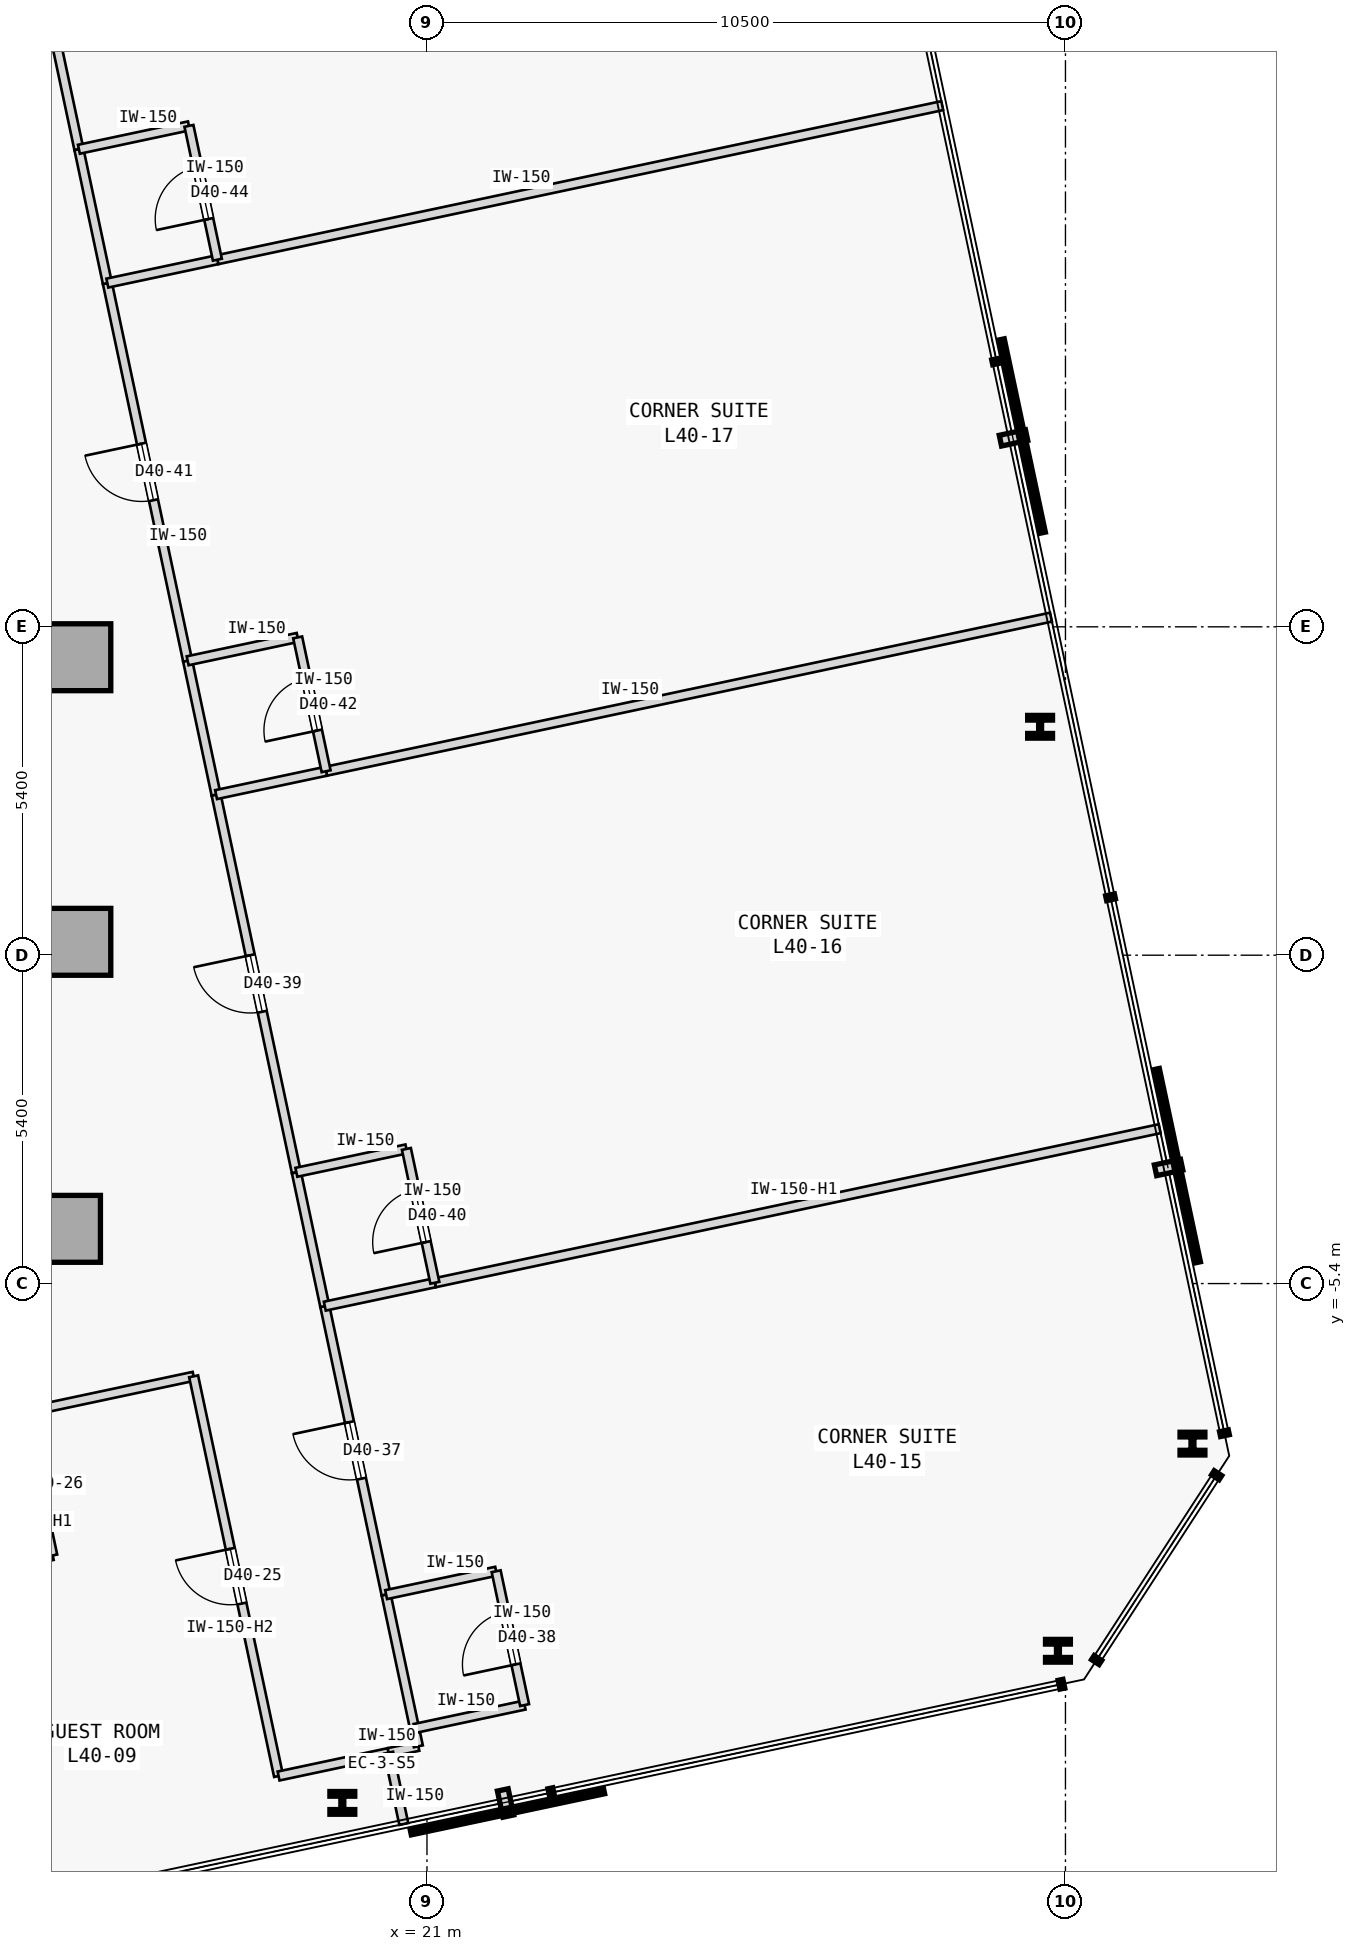
"""IFC4 building model, lengths in metres.
Left out: names, types, materials, properties, quantities, classifications, styles, units other than length and angle.
Written with IfcOpenShell. Run it as: python <this file> out.ifc"""

import sys

from ifc_helpers import new_model, si_unit, direction, frame, frame_2d, origin, origin_2d, place, context, subcontext, project, spatial, rectangle, i_section, extrude, element, fill, save


model = new_model("IFC4")
c1 = context("Model", 3, precision=1e-05, world=origin(), true_north=direction((0.0, 1.0)))
c2 = subcontext(c1, "Body", "Model", "MODEL_VIEW")
j1 = project(units=[si_unit("LENGTHUNIT", "METRE"), si_unit("PLANEANGLEUNIT", "RADIAN")], contexts=[c1])
p1 = place(None, origin())
s1 = spatial("IfcSite", under=j1, at=p1, CompositionType="ELEMENT")
p2 = place(p1, origin())
s2 = spatial("IfcBuilding", under=s1, at=p2, CompositionType="ELEMENT")
p3 = place(p2, frame((0.0, 0.0, 158.2)))
s3 = spatial("IfcBuildingStorey", under=s2, at=p3, CompositionType="ELEMENT", Elevation=158.2)
for number, where, z_axis, x_axis in (
    (1, (15.25, 4.9, 0.0), (0.0, 0.0, 1.0), (1.0, 0.0, 0.0)),
    (2, (15.25, 0.22, 0.0), (0.0, 0.0, 1.0), (1.0, 0.0, 0.0)),
    (3, (15.08, -4.5, 0.0), (0.0, 0.0, 1.0), (1.0, 0.0, 0.0)),
):
    element("IfcColumn", number, at=place(p3, frame(where, z_axis=z_axis, x_axis=x_axis)), inside=s3, PredefinedType="COLUMN", context=c2, shape_type="SweptSolid", body=[
        extrude(rectangle(XDim=1.1, YDim=1.1, at=origin_2d()), origin(), (0.0, 0.0, 1.0), 3.4),
    ])
for number, where, z_axis, x_axis in (
    (4, (19.608, -13.94, 0.0), (0.0, 0.0, 1.0), (1.0, 0.0, 0.0)),
    (5, (31.376, -11.439, 0.0), (0.0, 0.0, 1.0), (1.0, 0.0, 0.0)),
    (6, (33.589, -8.032, 0.0), (0.0, 0.0, 1.0), (1.0, 0.0, 0.0)),
    (7, (31.083, 3.756, 0.0), (0.0, 0.0, 1.0), (1.0, 0.0, 0.0)),
):
    element("IfcColumn", number, at=place(p3, frame(where, z_axis=z_axis, x_axis=x_axis)), inside=s3, PredefinedType="COLUMN", context=c2, shape_type="SweptSolid", body=[
        extrude(i_section(OverallWidth=0.409, OverallDepth=0.374, WebThickness=0.048, FlangeThickness=0.077, FilletRadius=0.015, at=origin_2d()), origin(), (0.0, 0.0, 1.0), 3.4),
    ])
p4 = place(p3, frame((14.346, -7.524, 0.0), z_axis=(0.0, 0.0, 1.0), x_axis=(0.97816208355, 0.207843542851, 0.0)))
e8 = element("IfcWall", 8, at=p4, inside=s3, PredefinedType="PARTITIONING", context=c2, shape_type="SweptSolid", body=[
    extrude(rectangle(XDim=2.879, YDim=0.15, at=frame_2d((1.439, 0.0))), origin(), (0.0, 0.0, 1.0), 3.175),
])
p5 = place(p3, frame((18.56, -13.498, 0.0), z_axis=(0.0, 0.0, 1.0), x_axis=(-0.207888737749, 0.978152479278, 0.0)))
e9 = element("IfcWall", 9, at=p5, inside=s3, PredefinedType="PARTITIONING", context=c2, shape_type="SweptSolid", body=[
    extrude(rectangle(XDim=6.72, YDim=0.15, at=frame_2d((3.36, 0.0))), origin(), (0.0, 0.0, 1.0), 2.575),
])
p6 = place(p5, frame((2.9, 0.0, 0.0)))
e10 = element("IfcOpeningElement", 10, at=p6, cuts=e9, PredefinedType="OPENING", context=c2, shape_type="SweptSolid", body=[
    extrude(rectangle(XDim=0.92, YDim=2.15, at=frame_2d((0.46, 1.075))), frame((0.0, 0.085, 0.0), z_axis=(0.0, -1.0, 0.0), x_axis=(1.0, 0.0, 0.0)), (0.0, 0.0, 1.0), 0.17),
])
p7 = place(p3, frame((18.56, -13.498, 0.0), z_axis=(0.0, 0.0, 1.0), x_axis=(0.978160192495, 0.207852442415, 0.0)))
e11 = element("IfcWall", 11, at=p7, inside=s3, PredefinedType="PARTITIONING", context=c2, shape_type="SweptSolid", body=[
    extrude(rectangle(XDim=1.85, YDim=0.15, at=frame_2d((0.925, 0.0))), origin(), (0.0, 0.0, 1.0), 3.175),
])
p8 = place(p3, frame((20.369, -13.114, 0.0), z_axis=(0.0, 0.0, 1.0), x_axis=(0.978143962546, 0.207928806409, 0.0)))
e12 = element("IfcWall", 12, at=p8, inside=s3, PredefinedType="PARTITIONING", context=c2, shape_type="SweptSolid", body=[
    extrude(rectangle(XDim=0.5, YDim=0.15, at=frame_2d((0.25, 0.0))), origin(), (0.0, 0.0, 1.0), 3.175),
])
p9 = place(p3, frame((20.858, -13.01, 0.0), z_axis=(0.0, 0.0, 1.0), x_axis=(-0.208306395052, 0.978063620518, 0.0)))
e13 = element("IfcWall", 13, at=p9, inside=s3, PredefinedType="PARTITIONING", context=c2, shape_type="SweptSolid", body=[
    extrude(rectangle(XDim=0.3, YDim=0.15, at=frame_2d((0.15, 0.0))), origin(), (0.0, 0.0, 1.0), 3.175),
])
p10 = place(p3, frame((20.328, -10.515, 0.0), z_axis=(0.0, 0.0, 1.0), x_axis=(-0.207950868925, 0.97813927235, 0.0)))
e14 = element("IfcWall", 14, at=p10, inside=s3, PredefinedType="PARTITIONING", context=c2, shape_type="SweptSolid", body=[
    extrude(rectangle(XDim=4.85, YDim=0.15, at=frame_2d((2.425, 0.0))), origin(), (0.0, 0.0, 1.0), 3.175),
])
p11 = place(p10, frame((1.95, 0.0, 0.0)))
e15 = element("IfcOpeningElement", 15, at=p11, cuts=e14, PredefinedType="OPENING", context=c2, shape_type="SweptSolid", body=[
    extrude(rectangle(XDim=0.95, YDim=2.15, at=frame_2d((0.475, 1.075))), frame((0.0, 0.085, 0.0), z_axis=(0.0, -1.0, 0.0), x_axis=(1.0, 0.0, 0.0)), (0.0, 0.0, 1.0), 0.17),
])
p12 = place(p3, frame((20.796, -12.716, 0.0), z_axis=(0.0, 0.0, 1.0), x_axis=(-0.207891197838, 0.978151956427, 0.0)))
e16 = element("IfcWall", 16, at=p12, inside=s3, PredefinedType="PARTITIONING", context=c2, shape_type="SweptSolid", body=[
    extrude(rectangle(XDim=2.25, YDim=0.15, at=frame_2d((1.125, 0.0))), origin(), (0.0, 0.0, 1.0), 3.175),
])
p13 = place(p3, frame((18.852, -3.571, 0.0), z_axis=(0.0, 0.0, 1.0), x_axis=(-0.207879907349, 0.978154355979, 0.0)))
e17 = element("IfcWall", 17, at=p13, inside=s3, PredefinedType="PARTITIONING", context=c2, shape_type="SweptSolid", body=[
    extrude(rectangle(XDim=6.35, YDim=0.15, at=frame_2d((3.175, 0.0))), origin(), (0.0, 0.0, 1.0), 3.175),
])
p14 = place(p13, frame((2.7, 0.0, 0.0)))
e18 = element("IfcOpeningElement", 18, at=p14, cuts=e17, PredefinedType="OPENING", context=c2, shape_type="SweptSolid", body=[
    extrude(rectangle(XDim=0.95, YDim=2.15, at=frame_2d((0.475, 1.075))), frame((0.0, 0.085, 0.0), z_axis=(0.0, -1.0, 0.0), x_axis=(1.0, 0.0, 0.0)), (0.0, 0.0, 1.0), 0.17),
])
p15 = place(p3, frame((19.32, -5.771, 0.0), z_axis=(0.0, 0.0, 1.0), x_axis=(-0.207913264065, 0.978147266328, 0.0)))
e19 = element("IfcWall", 19, at=p15, inside=s3, PredefinedType="PARTITIONING", context=c2, shape_type="SweptSolid", body=[
    extrude(rectangle(XDim=2.25, YDim=0.15, at=frame_2d((1.125, 0.0))), origin(), (0.0, 0.0, 1.0), 3.175),
])
p16 = place(p3, frame((17.064, 4.841, 0.0), z_axis=(0.0, 0.0, 1.0), x_axis=(-0.207924511115, 0.978144875608, 0.0)))
e20 = element("IfcWall", 20, at=p16, inside=s3, PredefinedType="PARTITIONING", context=c2, shape_type="SweptSolid", body=[
    extrude(rectangle(XDim=6.35, YDim=0.15, at=frame_2d((3.175, 0.0))), origin(), (0.0, 0.0, 1.0), 3.175),
])
p17 = place(p16, frame((2.7, 0.0, 0.0)))
e21 = element("IfcOpeningElement", 21, at=p17, cuts=e20, PredefinedType="OPENING", context=c2, shape_type="SweptSolid", body=[
    extrude(rectangle(XDim=0.95, YDim=2.15, at=frame_2d((0.475, 1.075))), frame((0.0, 0.085, 0.0), z_axis=(0.0, -1.0, 0.0), x_axis=(1.0, 0.0, 0.0)), (0.0, 0.0, 1.0), 0.17),
])
p18 = place(p3, frame((17.532, 2.641, 0.0), z_axis=(0.0, 0.0, 1.0), x_axis=(-0.207913264065, 0.978147266328, 0.0)))
e22 = element("IfcWall", 22, at=p18, inside=s3, PredefinedType="PARTITIONING", context=c2, shape_type="SweptSolid", body=[
    extrude(rectangle(XDim=2.25, YDim=0.15, at=frame_2d((1.125, 0.0))), origin(), (0.0, 0.0, 1.0), 3.175),
])
p19 = place(p3, frame((15.276, 13.253, 0.0), z_axis=(0.0, 0.0, 1.0), x_axis=(-0.207924511115, 0.978144875608, 0.0)))
e23 = element("IfcWall", 23, at=p19, inside=s3, PredefinedType="PARTITIONING", context=c2, shape_type="SweptSolid", body=[
    extrude(rectangle(XDim=6.35, YDim=0.15, at=frame_2d((3.175, 0.0))), origin(), (0.0, 0.0, 1.0), 3.175),
])
p20 = place(p19, frame((2.7, 0.0, 0.0)))
e24 = element("IfcOpeningElement", 24, at=p20, cuts=e23, PredefinedType="OPENING", context=c2, shape_type="SweptSolid", body=[
    extrude(rectangle(XDim=0.95, YDim=2.15, at=frame_2d((0.475, 1.075))), frame((0.0, 0.085, 0.0), z_axis=(0.0, -1.0, 0.0), x_axis=(1.0, 0.0, 0.0)), (0.0, 0.0, 1.0), 0.17),
])
p21 = place(p3, frame((15.744, 11.052, 0.0), z_axis=(0.0, 0.0, 1.0), x_axis=(-0.207891197838, 0.978151956427, 0.0)))
e25 = element("IfcWall", 25, at=p21, inside=s3, PredefinedType="PARTITIONING", context=c2, shape_type="SweptSolid", body=[
    extrude(rectangle(XDim=2.25, YDim=0.15, at=frame_2d((1.125, 0.0))), origin(), (0.0, 0.0, 1.0), 3.175),
])
p22 = place(p3, frame((12.742, -10.318, 0.0), z_axis=(0.0, 0.0, 1.0), x_axis=(0.978146728319, 0.207915795165, 0.0)))
e26 = element("IfcWall", 26, at=p22, inside=s3, PredefinedType="PARTITIONING", context=c2, shape_type="SweptSolid", body=[
    extrude(rectangle(XDim=2.15, YDim=0.15, at=frame_2d((1.075, 0.0))), origin(), (0.0, 0.0, 1.0), 3.175),
])
p23 = place(p3, frame((14.845, -9.871, 0.0), z_axis=(0.0, 0.0, 1.0), x_axis=(-0.207917150959, 0.978146440129, 0.0)))
e27 = element("IfcWall", 27, at=p23, inside=s3, PredefinedType="PARTITIONING", context=c2, shape_type="SweptSolid", body=[
    extrude(rectangle(XDim=2.4, YDim=0.15, at=frame_2d((1.2, 0.0))), origin(), (0.0, 0.0, 1.0), 2.725),
])
p24 = place(p23, frame((0.76, 0.0, 0.0)))
e28 = element("IfcOpeningElement", 28, at=p24, cuts=e27, PredefinedType="OPENING", context=c2, shape_type="SweptSolid", body=[
    extrude(rectangle(XDim=0.88, YDim=2.15, at=frame_2d((0.44, 1.075))), frame((0.0, 0.085, 0.0), z_axis=(0.0, -1.0, 0.0), x_axis=(1.0, 0.0, 0.0)), (0.0, 0.0, 1.0), 0.17),
])
p25 = place(p3, frame((20.619, -14.288, 0.0), z_axis=(0.0, 0.0, 1.0), x_axis=(-0.207917150959, 0.978146440129, 0.0)))
e29 = element("IfcWall", 29, at=p25, inside=s3, PredefinedType="PARTITIONING", context=c2, shape_type="SweptSolid", body=[
    extrude(rectangle(XDim=1.2, YDim=0.15, at=frame_2d((0.6, 0.0))), origin(), (0.0, 0.0, 1.0), 3.175),
])
for number, where, z_axis, x_axis in (
    (30, (20.796, -12.716, 0.0), (0.0, 0.0, 1.0), (0.978, 0.208, 0.0)),
    (31, (20.328, -10.515, 0.0), (0.0, 0.0, 1.0), (0.978, 0.208, 0.0)),
):
    element("IfcWall", number, at=place(p3, frame(where, z_axis=z_axis, x_axis=x_axis)), inside=s3, PredefinedType="PARTITIONING", context=c2, shape_type="SweptSolid", body=[
        extrude(rectangle(XDim=1.85, YDim=0.15, at=frame_2d((0.925, 0.0))), origin(), (0.0, 0.0, 1.0), 3.175),
    ])
p26 = place(p3, frame((22.605, -12.332, 0.0), z_axis=(0.0, 0.0, 1.0), x_axis=(-0.207891197838, 0.978151956427, 0.0)))
e32 = element("IfcWall", 32, at=p26, inside=s3, PredefinedType="PARTITIONING", context=c2, shape_type="SweptSolid", body=[
    extrude(rectangle(XDim=2.25, YDim=0.15, at=frame_2d((1.125, 0.0))), origin(), (0.0, 0.0, 1.0), 3.175),
])
p27 = place(p26, frame((0.685, 0.0, 0.0)))
e33 = element("IfcOpeningElement", 33, at=p27, cuts=e32, PredefinedType="OPENING", context=c2, shape_type="SweptSolid", body=[
    extrude(rectangle(XDim=0.88, YDim=2.15, at=frame_2d((0.44, 1.075))), frame((0.0, 0.085, 0.0), z_axis=(0.0, -1.0, 0.0), x_axis=(1.0, 0.0, 0.0)), (0.0, 0.0, 1.0), 0.17),
])
p28 = place(p3, frame((21.129, -5.387, 0.0), z_axis=(0.0, 0.0, 1.0), x_axis=(0.97814556055, 0.207921288896, 0.0)))
e34 = element("IfcWall", 34, at=p28, inside=s3, PredefinedType="PARTITIONING", context=c2, shape_type="SweptSolid", body=[
    extrude(rectangle(XDim=12.187, YDim=0.15, at=frame_2d((6.094, 0.0))), origin(), (0.0, 0.0, 1.0), 2.725),
])
p29 = place(p3, frame((19.32, -5.771, 0.0), z_axis=(0.0, 0.0, 1.0), x_axis=(0.978165892835, 0.207825614625, 0.0)))
e35 = element("IfcWall", 35, at=p29, inside=s3, PredefinedType="PARTITIONING", context=c2, shape_type="SweptSolid", body=[
    extrude(rectangle(XDim=1.85, YDim=0.15, at=frame_2d((0.925, 0.0))), origin(), (0.0, 0.0, 1.0), 3.175),
])
p30 = place(p3, frame((18.852, -3.571, 0.0), z_axis=(0.0, 0.0, 1.0), x_axis=(0.978139061018, 0.207951862966, 0.0)))
e36 = element("IfcWall", 36, at=p30, inside=s3, PredefinedType="PARTITIONING", context=c2, shape_type="SweptSolid", body=[
    extrude(rectangle(XDim=1.85, YDim=0.15, at=frame_2d((0.925, 0.0))), origin(), (0.0, 0.0, 1.0), 3.175),
])
p31 = place(p3, frame((21.129, -5.387, 0.0), z_axis=(0.0, 0.0, 1.0), x_axis=(-0.207891197838, 0.978151956427, 0.0)))
e37 = element("IfcWall", 37, at=p31, inside=s3, PredefinedType="PARTITIONING", context=c2, shape_type="SweptSolid", body=[
    extrude(rectangle(XDim=2.25, YDim=0.15, at=frame_2d((1.125, 0.0))), origin(), (0.0, 0.0, 1.0), 3.175),
])
p32 = place(p31, frame((0.685, 0.0, 0.0)))
e38 = element("IfcOpeningElement", 38, at=p32, cuts=e37, PredefinedType="OPENING", context=c2, shape_type="SweptSolid", body=[
    extrude(rectangle(XDim=0.88, YDim=2.15, at=frame_2d((0.44, 1.075))), frame((0.0, 0.085, 0.0), z_axis=(0.0, -1.0, 0.0), x_axis=(1.0, 0.0, 0.0)), (0.0, 0.0, 1.0), 0.17),
])
p33 = place(p3, frame((19.341, 3.025, 0.0), z_axis=(0.0, 0.0, 1.0), x_axis=(0.97814556055, 0.207921288896, 0.0)))
e39 = element("IfcWall", 39, at=p33, inside=s3, PredefinedType="PARTITIONING", context=c2, shape_type="SweptSolid", body=[
    extrude(rectangle(XDim=12.187, YDim=0.15, at=frame_2d((6.094, 0.0))), origin(), (0.0, 0.0, 1.0), 3.175),
])
p34 = place(p3, frame((17.532, 2.641, 0.0), z_axis=(0.0, 0.0, 1.0), x_axis=(0.978160192495, 0.207852442415, 0.0)))
e40 = element("IfcWall", 40, at=p34, inside=s3, PredefinedType="PARTITIONING", context=c2, shape_type="SweptSolid", body=[
    extrude(rectangle(XDim=1.85, YDim=0.15, at=frame_2d((0.925, 0.0))), origin(), (0.0, 0.0, 1.0), 3.175),
])
p35 = place(p3, frame((17.064, 4.841, 0.0), z_axis=(0.0, 0.0, 1.0), x_axis=(0.978133353907, 0.20797870558, 0.0)))
e41 = element("IfcWall", 41, at=p35, inside=s3, PredefinedType="PARTITIONING", context=c2, shape_type="SweptSolid", body=[
    extrude(rectangle(XDim=1.85, YDim=0.15, at=frame_2d((0.925, 0.0))), origin(), (0.0, 0.0, 1.0), 3.175),
])
p36 = place(p3, frame((19.341, 3.025, 0.0), z_axis=(0.0, 0.0, 1.0), x_axis=(-0.207891197838, 0.978151956427, 0.0)))
e42 = element("IfcWall", 42, at=p36, inside=s3, PredefinedType="PARTITIONING", context=c2, shape_type="SweptSolid", body=[
    extrude(rectangle(XDim=2.25, YDim=0.15, at=frame_2d((1.125, 0.0))), origin(), (0.0, 0.0, 1.0), 3.175),
])
p37 = place(p36, frame((0.685, 0.0, 0.0)))
e43 = element("IfcOpeningElement", 43, at=p37, cuts=e42, PredefinedType="OPENING", context=c2, shape_type="SweptSolid", body=[
    extrude(rectangle(XDim=0.88, YDim=2.15, at=frame_2d((0.44, 1.075))), frame((0.0, 0.085, 0.0), z_axis=(0.0, -1.0, 0.0), x_axis=(1.0, 0.0, 0.0)), (0.0, 0.0, 1.0), 0.17),
])
p38 = place(p3, frame((17.553, 11.437, 0.0), z_axis=(0.0, 0.0, 1.0), x_axis=(0.97814556055, 0.207921288896, 0.0)))
e44 = element("IfcWall", 44, at=p38, inside=s3, PredefinedType="PARTITIONING", context=c2, shape_type="SweptSolid", body=[
    extrude(rectangle(XDim=12.187, YDim=0.15, at=frame_2d((6.094, 0.0))), origin(), (0.0, 0.0, 1.0), 3.175),
])
for number, where, z_axis, x_axis in (
    (45, (15.744, 11.052, 0.0), (0.0, 0.0, 1.0), (0.978, 0.208, 0.0)),
    (46, (15.276, 13.253, 0.0), (0.0, 0.0, 1.0), (0.978, 0.208, 0.0)),
):
    element("IfcWall", number, at=place(p3, frame(where, z_axis=z_axis, x_axis=x_axis)), inside=s3, PredefinedType="PARTITIONING", context=c2, shape_type="SweptSolid", body=[
        extrude(rectangle(XDim=1.85, YDim=0.15, at=frame_2d((0.925, 0.0))), origin(), (0.0, 0.0, 1.0), 3.175),
    ])
p39 = place(p3, frame((17.553, 11.437, 0.0), z_axis=(0.0, 0.0, 1.0), x_axis=(-0.207891197838, 0.978151956427, 0.0)))
e47 = element("IfcWall", 47, at=p39, inside=s3, PredefinedType="PARTITIONING", context=c2, shape_type="SweptSolid", body=[
    extrude(rectangle(XDim=2.25, YDim=0.15, at=frame_2d((1.125, 0.0))), origin(), (0.0, 0.0, 1.0), 3.175),
])
p40 = place(p39, frame((0.685, 0.0, 0.0)))
e48 = element("IfcOpeningElement", 48, at=p40, cuts=e47, PredefinedType="OPENING", context=c2, shape_type="SweptSolid", body=[
    extrude(rectangle(XDim=0.88, YDim=2.15, at=frame_2d((0.44, 1.075))), frame((0.0, 0.085, 0.0), z_axis=(0.0, -1.0, 0.0), x_axis=(1.0, 0.0, 0.0)), (0.0, 0.0, 1.0), 0.17),
])
p41 = place(p6, origin())
e49 = element("IfcDoor", 49, at=p41, inside=s3, OperationType="SINGLE_SWING_RIGHT", PredefinedType="DOOR", context=c2, shape_type="SweptSolid", body=[
    extrude(rectangle(XDim=0.92, YDim=2.15, at=frame_2d((0.46, 1.075))), frame((0.0, 0.025, 0.0), z_axis=(0.0, -1.0, 0.0), x_axis=(1.0, 0.0, 0.0)), (0.0, 0.0, 1.0), 0.05),
])
fill(e10, e49)
p42 = place(p11, origin())
e50 = element("IfcDoor", 50, at=p42, inside=s3, OperationType="SINGLE_SWING_RIGHT", PredefinedType="DOOR", context=c2, shape_type="SweptSolid", body=[
    extrude(rectangle(XDim=0.95, YDim=2.15, at=frame_2d((0.475, 1.075))), frame((0.0, 0.025, 0.0), z_axis=(0.0, -1.0, 0.0), x_axis=(1.0, 0.0, 0.0)), (0.0, 0.0, 1.0), 0.05),
])
fill(e15, e50)
p43 = place(p27, origin())
e51 = element("IfcDoor", 51, at=p43, inside=s3, OperationType="SINGLE_SWING_LEFT", PredefinedType="DOOR", context=c2, shape_type="SweptSolid", body=[
    extrude(rectangle(XDim=0.88, YDim=2.15, at=frame_2d((0.44, 1.075))), frame((0.0, 0.025, 0.0), z_axis=(0.0, -1.0, 0.0), x_axis=(1.0, 0.0, 0.0)), (0.0, 0.0, 1.0), 0.05),
])
fill(e33, e51)
p44 = place(p14, origin())
e52 = element("IfcDoor", 52, at=p44, inside=s3, OperationType="SINGLE_SWING_RIGHT", PredefinedType="DOOR", context=c2, shape_type="SweptSolid", body=[
    extrude(rectangle(XDim=0.95, YDim=2.15, at=frame_2d((0.475, 1.075))), frame((0.0, 0.025, 0.0), z_axis=(0.0, -1.0, 0.0), x_axis=(1.0, 0.0, 0.0)), (0.0, 0.0, 1.0), 0.05),
])
fill(e18, e52)
p45 = place(p32, origin())
e53 = element("IfcDoor", 53, at=p45, inside=s3, OperationType="SINGLE_SWING_LEFT", PredefinedType="DOOR", context=c2, shape_type="SweptSolid", body=[
    extrude(rectangle(XDim=0.88, YDim=2.15, at=frame_2d((0.44, 1.075))), frame((0.0, 0.025, 0.0), z_axis=(0.0, -1.0, 0.0), x_axis=(1.0, 0.0, 0.0)), (0.0, 0.0, 1.0), 0.05),
])
fill(e38, e53)
p46 = place(p17, origin())
e54 = element("IfcDoor", 54, at=p46, inside=s3, OperationType="SINGLE_SWING_RIGHT", PredefinedType="DOOR", context=c2, shape_type="SweptSolid", body=[
    extrude(rectangle(XDim=0.95, YDim=2.15, at=frame_2d((0.475, 1.075))), frame((0.0, 0.025, 0.0), z_axis=(0.0, -1.0, 0.0), x_axis=(1.0, 0.0, 0.0)), (0.0, 0.0, 1.0), 0.05),
])
fill(e21, e54)
p47 = place(p37, origin())
e55 = element("IfcDoor", 55, at=p47, inside=s3, OperationType="SINGLE_SWING_LEFT", PredefinedType="DOOR", context=c2, shape_type="SweptSolid", body=[
    extrude(rectangle(XDim=0.88, YDim=2.15, at=frame_2d((0.44, 1.075))), frame((0.0, 0.025, 0.0), z_axis=(0.0, -1.0, 0.0), x_axis=(1.0, 0.0, 0.0)), (0.0, 0.0, 1.0), 0.05),
])
fill(e43, e55)
p48 = place(p40, origin())
e56 = element("IfcDoor", 56, at=p48, inside=s3, OperationType="SINGLE_SWING_LEFT", PredefinedType="DOOR", context=c2, shape_type="SweptSolid", body=[
    extrude(rectangle(XDim=0.88, YDim=2.15, at=frame_2d((0.44, 1.075))), frame((0.0, 0.025, 0.0), z_axis=(0.0, -1.0, 0.0), x_axis=(1.0, 0.0, 0.0)), (0.0, 0.0, 1.0), 0.05),
])
fill(e48, e56)
save(model, sys.argv[1])
